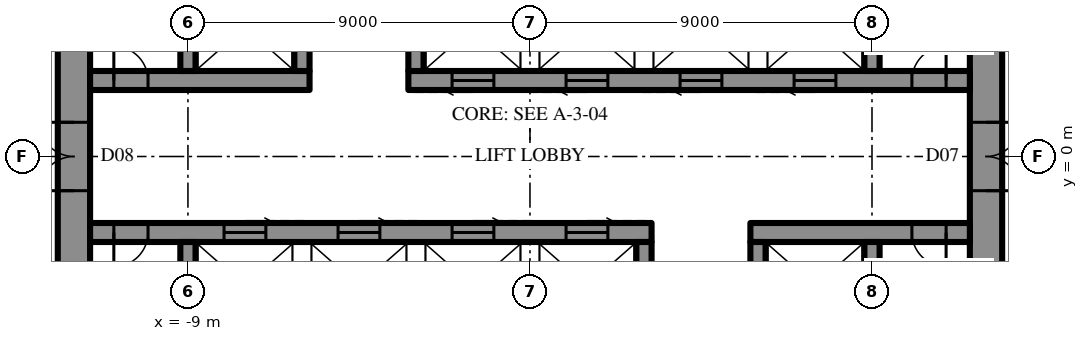
"""IFC4 building model, lengths in metres.
Left out: names, types, materials, properties, quantities, classifications, styles, units other than length and angle.
Written with IfcOpenShell. Run it as: python <this file> out.ifc"""

import sys

from ifc_helpers import new_model, si_unit, direction, frame, frame_2d, origin, place, context, subcontext, project, spatial, rectangle, extrude, element, fill, save


model = new_model("IFC4")
c1 = context("Model", 3, precision=1e-05, world=origin(), true_north=direction((0.0, 1.0)))
c2 = subcontext(c1, "Body", "Model", "MODEL_VIEW")
j1 = project(units=[si_unit("LENGTHUNIT", "METRE"), si_unit("PLANEANGLEUNIT", "RADIAN")], contexts=[c1])
p1 = place(None, origin())
s1 = spatial("IfcSite", under=j1, at=p1, CompositionType="ELEMENT")
p2 = place(p1, origin())
s2 = spatial("IfcBuilding", under=s1, at=p2, CompositionType="ELEMENT")
p3 = place(p2, frame((0.0, 0.0, 311.5)))
s3 = spatial("IfcBuildingStorey", under=s2, at=p3, CompositionType="ELEMENT", Elevation=311.5)
p4 = place(p3, frame((12.0, -10.7, 0.0), z_axis=(0.0, 0.0, 1.0), x_axis=(0.0, 1.0, 0.0)))
e1 = element("IfcWall", 1, at=p4, inside=s3, PredefinedType="SHEAR", context=c2, shape_type="SweptSolid", body=[
    extrude(rectangle(XDim=21.4, YDim=0.85, at=frame_2d((10.7, 0.0))), origin(), (0.0, 0.0, 1.0), 4.2),
])
p5 = place(p4, frame((9.8, 0.0, 0.0)))
e2 = element("IfcOpeningElement", 2, at=p5, cuts=e1, PredefinedType="OPENING", context=c2, shape_type="SweptSolid", body=[
    extrude(rectangle(XDim=1.8, YDim=2.4, at=frame_2d((0.9, 1.2))), frame((0.0, 0.435, 0.0), z_axis=(0.0, -1.0, 0.0), x_axis=(1.0, 0.0, 0.0)), (0.0, 0.0, 1.0), 0.87),
])
p6 = place(p3, frame((-12.0, 10.7, 0.0), z_axis=(0.0, 0.0, 1.0), x_axis=(0.0, -1.0, 0.0)))
e3 = element("IfcWall", 3, at=p6, inside=s3, PredefinedType="SHEAR", context=c2, shape_type="SweptSolid", body=[
    extrude(rectangle(XDim=21.4, YDim=0.85, at=frame_2d((10.7, 0.0))), origin(), (0.0, 0.0, 1.0), 4.2),
])
p7 = place(p6, frame((9.8, 0.0, 0.0)))
e4 = element("IfcOpeningElement", 4, at=p7, cuts=e3, PredefinedType="OPENING", context=c2, shape_type="SweptSolid", body=[
    extrude(rectangle(XDim=1.8, YDim=2.4, at=frame_2d((0.9, 1.2))), frame((0.0, 0.435, 0.0), z_axis=(0.0, -1.0, 0.0), x_axis=(1.0, 0.0, 0.0)), (0.0, 0.0, 1.0), 0.87),
])
p8 = place(p3, frame((-11.575, 2.0, 0.0), z_axis=(0.0, 0.0, 1.0), x_axis=(1.0, 0.0, 0.0)))
e5 = element("IfcWall", 5, at=p8, inside=s3, PredefinedType="SHEAR", context=c2, shape_type="SweptSolid", body=[
    extrude(rectangle(XDim=5.775, YDim=0.5, at=frame_2d((2.887, 0.0))), origin(), (0.0, 0.0, 1.0), 4.2),
])
p9 = place(p8, frame((0.625, 0.0, 0.0)))
e6 = element("IfcOpeningElement", 6, at=p9, cuts=e5, PredefinedType="OPENING", context=c2, shape_type="SweptSolid", body=[
    extrude(rectangle(XDim=0.9, YDim=2.2, at=frame_2d((0.45, 1.1))), frame((0.0, 0.26, 0.0), z_axis=(0.0, -1.0, 0.0), x_axis=(1.0, 0.0, 0.0)), (0.0, 0.0, 1.0), 0.52),
])
p10 = place(p3, frame((-3.2, 2.0, 0.0), z_axis=(0.0, 0.0, 1.0), x_axis=(1.0, 0.0, 0.0)))
e7 = element("IfcWall", 7, at=p10, inside=s3, PredefinedType="SHEAR", context=c2, shape_type="SweptSolid", body=[
    extrude(rectangle(XDim=14.775, YDim=0.5, at=frame_2d((7.387, 0.0))), origin(), (0.0, 0.0, 1.0), 4.2),
])
p11 = place(p10, frame((13.25, 0.0, 0.0)))
e8 = element("IfcOpeningElement", 8, at=p11, cuts=e7, PredefinedType="OPENING", context=c2, shape_type="SweptSolid", body=[
    extrude(rectangle(XDim=0.9, YDim=2.2, at=frame_2d((0.45, 1.1))), frame((0.0, 0.26, 0.0), z_axis=(0.0, -1.0, 0.0), x_axis=(1.0, 0.0, 0.0)), (0.0, 0.0, 1.0), 0.52),
])
p12 = place(p10, frame((1.15, 0.0, 0.0)))
e9 = element("IfcOpeningElement", 9, at=p12, cuts=e7, PredefinedType="OPENING", context=c2, shape_type="SweptSolid", body=[
    extrude(rectangle(XDim=1.1, YDim=2.2, at=frame_2d((0.55, 1.1))), frame((0.0, 0.26, 0.0), z_axis=(0.0, -1.0, 0.0), x_axis=(1.0, 0.0, 0.0)), (0.0, 0.0, 1.0), 0.52),
])
p13 = place(p10, frame((4.15, 0.0, 0.0)))
e10 = element("IfcOpeningElement", 10, at=p13, cuts=e7, PredefinedType="OPENING", context=c2, shape_type="SweptSolid", body=[
    extrude(rectangle(XDim=1.1, YDim=2.2, at=frame_2d((0.55, 1.1))), frame((0.0, 0.26, 0.0), z_axis=(0.0, -1.0, 0.0), x_axis=(1.0, 0.0, 0.0)), (0.0, 0.0, 1.0), 0.52),
])
p14 = place(p10, frame((7.15, 0.0, 0.0)))
e11 = element("IfcOpeningElement", 11, at=p14, cuts=e7, PredefinedType="OPENING", context=c2, shape_type="SweptSolid", body=[
    extrude(rectangle(XDim=1.1, YDim=2.2, at=frame_2d((0.55, 1.1))), frame((0.0, 0.26, 0.0), z_axis=(0.0, -1.0, 0.0), x_axis=(1.0, 0.0, 0.0)), (0.0, 0.0, 1.0), 0.52),
])
p15 = place(p10, frame((10.15, 0.0, 0.0)))
e12 = element("IfcOpeningElement", 12, at=p15, cuts=e7, PredefinedType="OPENING", context=c2, shape_type="SweptSolid", body=[
    extrude(rectangle(XDim=1.1, YDim=2.2, at=frame_2d((0.55, 1.1))), frame((0.0, 0.26, 0.0), z_axis=(0.0, -1.0, 0.0), x_axis=(1.0, 0.0, 0.0)), (0.0, 0.0, 1.0), 0.52),
])
for number, where, z_axis, x_axis in (
    (13, (-9.0, 2.25, 0.0), (0.0, 0.0, 1.0), (0.0, 1.0, 0.0)),
    (14, (-6.0, 2.25, 0.0), (0.0, 0.0, 1.0), (0.0, 1.0, 0.0)),
    (15, (-3.0, 2.25, 0.0), (0.0, 0.0, 1.0), (0.0, 1.0, 0.0)),
    (16, (9.0, 2.25, 0.0), (0.0, 0.0, 1.0), (0.0, 1.0, 0.0)),
):
    element("IfcWall", number, at=place(p3, frame(where, z_axis=z_axis, x_axis=x_axis)), inside=s3, PredefinedType="SHEAR", context=c2, shape_type="SweptSolid", body=[
        extrude(rectangle(XDim=2.3, YDim=0.4, at=frame_2d((1.15, 0.0))), origin(), (0.0, 0.0, 1.0), 4.2),
    ])
p16 = place(p3, frame((11.575, -2.0, 0.0), z_axis=(0.0, 0.0, 1.0), x_axis=(-1.0, 0.0, 0.0)))
e17 = element("IfcWall", 17, at=p16, inside=s3, PredefinedType="SHEAR", context=c2, shape_type="SweptSolid", body=[
    extrude(rectangle(XDim=5.775, YDim=0.5, at=frame_2d((2.887, 0.0))), origin(), (0.0, 0.0, 1.0), 4.2),
])
p17 = place(p16, frame((0.625, 0.0, 0.0)))
e18 = element("IfcOpeningElement", 18, at=p17, cuts=e17, PredefinedType="OPENING", context=c2, shape_type="SweptSolid", body=[
    extrude(rectangle(XDim=0.9, YDim=2.2, at=frame_2d((0.45, 1.1))), frame((0.0, 0.26, 0.0), z_axis=(0.0, -1.0, 0.0), x_axis=(1.0, 0.0, 0.0)), (0.0, 0.0, 1.0), 0.52),
])
p18 = place(p3, frame((3.2, -2.0, 0.0), z_axis=(0.0, 0.0, 1.0), x_axis=(-1.0, 0.0, 0.0)))
e19 = element("IfcWall", 19, at=p18, inside=s3, PredefinedType="SHEAR", context=c2, shape_type="SweptSolid", body=[
    extrude(rectangle(XDim=14.775, YDim=0.5, at=frame_2d((7.387, 0.0))), origin(), (0.0, 0.0, 1.0), 4.2),
])
p19 = place(p18, frame((13.25, 0.0, 0.0)))
e20 = element("IfcOpeningElement", 20, at=p19, cuts=e19, PredefinedType="OPENING", context=c2, shape_type="SweptSolid", body=[
    extrude(rectangle(XDim=0.9, YDim=2.2, at=frame_2d((0.45, 1.1))), frame((0.0, 0.26, 0.0), z_axis=(0.0, -1.0, 0.0), x_axis=(1.0, 0.0, 0.0)), (0.0, 0.0, 1.0), 0.52),
])
p20 = place(p18, frame((1.15, 0.0, 0.0)))
e21 = element("IfcOpeningElement", 21, at=p20, cuts=e19, PredefinedType="OPENING", context=c2, shape_type="SweptSolid", body=[
    extrude(rectangle(XDim=1.1, YDim=2.2, at=frame_2d((0.55, 1.1))), frame((0.0, 0.26, 0.0), z_axis=(0.0, -1.0, 0.0), x_axis=(1.0, 0.0, 0.0)), (0.0, 0.0, 1.0), 0.52),
])
p21 = place(p18, frame((4.15, 0.0, 0.0)))
e22 = element("IfcOpeningElement", 22, at=p21, cuts=e19, PredefinedType="OPENING", context=c2, shape_type="SweptSolid", body=[
    extrude(rectangle(XDim=1.1, YDim=2.2, at=frame_2d((0.55, 1.1))), frame((0.0, 0.26, 0.0), z_axis=(0.0, -1.0, 0.0), x_axis=(1.0, 0.0, 0.0)), (0.0, 0.0, 1.0), 0.52),
])
p22 = place(p18, frame((7.15, 0.0, 0.0)))
e23 = element("IfcOpeningElement", 23, at=p22, cuts=e19, PredefinedType="OPENING", context=c2, shape_type="SweptSolid", body=[
    extrude(rectangle(XDim=1.1, YDim=2.2, at=frame_2d((0.55, 1.1))), frame((0.0, 0.26, 0.0), z_axis=(0.0, -1.0, 0.0), x_axis=(1.0, 0.0, 0.0)), (0.0, 0.0, 1.0), 0.52),
])
p23 = place(p18, frame((10.15, 0.0, 0.0)))
e24 = element("IfcOpeningElement", 24, at=p23, cuts=e19, PredefinedType="OPENING", context=c2, shape_type="SweptSolid", body=[
    extrude(rectangle(XDim=1.1, YDim=2.2, at=frame_2d((0.55, 1.1))), frame((0.0, 0.26, 0.0), z_axis=(0.0, -1.0, 0.0), x_axis=(1.0, 0.0, 0.0)), (0.0, 0.0, 1.0), 0.52),
])
for number, where, z_axis, x_axis in (
    (25, (9.0, -2.25, 0.0), (0.0, 0.0, 1.0), (0.0, -1.0, 0.0)),
    (26, (6.0, -2.25, 0.0), (0.0, 0.0, 1.0), (0.0, -1.0, 0.0)),
    (27, (3.0, -2.25, 0.0), (0.0, 0.0, 1.0), (0.0, -1.0, 0.0)),
    (28, (-9.0, -2.25, 0.0), (0.0, 0.0, 1.0), (0.0, -1.0, 0.0)),
):
    element("IfcWall", number, at=place(p3, frame(where, z_axis=z_axis, x_axis=x_axis)), inside=s3, PredefinedType="SHEAR", context=c2, shape_type="SweptSolid", body=[
        extrude(rectangle(XDim=2.3, YDim=0.4, at=frame_2d((1.15, 0.0))), origin(), (0.0, 0.0, 1.0), 4.2),
    ])
p24 = place(p5, frame((1.8, 0.0, 0.0), z_axis=(0.0, 0.0, 1.0), x_axis=(-1.0, 0.0, 0.0)))
e29 = element("IfcDoor", 29, at=p24, inside=s3, OperationType="DOUBLE_DOOR_SINGLE_SWING", PredefinedType="DOOR", context=c2, shape_type="SweptSolid", body=[
    extrude(rectangle(XDim=1.8, YDim=2.4, at=frame_2d((0.9, 1.2))), frame((0.0, 0.025, 0.0), z_axis=(0.0, -1.0, 0.0), x_axis=(1.0, 0.0, 0.0)), (0.0, 0.0, 1.0), 0.05),
])
fill(e2, e29)
p25 = place(p7, frame((1.8, 0.0, 0.0), z_axis=(0.0, 0.0, 1.0), x_axis=(-1.0, 0.0, 0.0)))
e30 = element("IfcDoor", 30, at=p25, inside=s3, OperationType="DOUBLE_DOOR_SINGLE_SWING", PredefinedType="DOOR", context=c2, shape_type="SweptSolid", body=[
    extrude(rectangle(XDim=1.8, YDim=2.4, at=frame_2d((0.9, 1.2))), frame((0.0, 0.025, 0.0), z_axis=(0.0, -1.0, 0.0), x_axis=(1.0, 0.0, 0.0)), (0.0, 0.0, 1.0), 0.05),
])
fill(e4, e30)
p26 = place(p9, origin())
e31 = element("IfcDoor", 31, at=p26, inside=s3, OperationType="SINGLE_SWING_RIGHT", PredefinedType="DOOR", context=c2, shape_type="SweptSolid", body=[
    extrude(rectangle(XDim=0.9, YDim=2.2, at=frame_2d((0.45, 1.1))), frame((0.0, 0.025, 0.0), z_axis=(0.0, -1.0, 0.0), x_axis=(1.0, 0.0, 0.0)), (0.0, 0.0, 1.0), 0.05),
])
fill(e6, e31)
p27 = place(p11, origin())
e32 = element("IfcDoor", 32, at=p27, inside=s3, OperationType="SINGLE_SWING_LEFT", PredefinedType="DOOR", context=c2, shape_type="SweptSolid", body=[
    extrude(rectangle(XDim=0.9, YDim=2.2, at=frame_2d((0.45, 1.1))), frame((0.0, 0.025, 0.0), z_axis=(0.0, -1.0, 0.0), x_axis=(1.0, 0.0, 0.0)), (0.0, 0.0, 1.0), 0.05),
])
fill(e8, e32)
p28 = place(p17, origin())
e33 = element("IfcDoor", 33, at=p28, inside=s3, OperationType="SINGLE_SWING_RIGHT", PredefinedType="DOOR", context=c2, shape_type="SweptSolid", body=[
    extrude(rectangle(XDim=0.9, YDim=2.2, at=frame_2d((0.45, 1.1))), frame((0.0, 0.025, 0.0), z_axis=(0.0, -1.0, 0.0), x_axis=(1.0, 0.0, 0.0)), (0.0, 0.0, 1.0), 0.05),
])
fill(e18, e33)
p29 = place(p19, origin())
e34 = element("IfcDoor", 34, at=p29, inside=s3, OperationType="SINGLE_SWING_LEFT", PredefinedType="DOOR", context=c2, shape_type="SweptSolid", body=[
    extrude(rectangle(XDim=0.9, YDim=2.2, at=frame_2d((0.45, 1.1))), frame((0.0, 0.025, 0.0), z_axis=(0.0, -1.0, 0.0), x_axis=(1.0, 0.0, 0.0)), (0.0, 0.0, 1.0), 0.05),
])
fill(e20, e34)
p30 = place(p12, frame((1.1, 0.0, 0.0), z_axis=(0.0, 0.0, 1.0), x_axis=(-1.0, 0.0, 0.0)))
e35 = element("IfcDoor", 35, at=p30, inside=s3, OperationType="SLIDING_TO_LEFT", PredefinedType="DOOR", context=c2, shape_type="SweptSolid", body=[
    extrude(rectangle(XDim=1.1, YDim=2.2, at=frame_2d((0.55, 1.1))), frame((0.0, 0.025, 0.0), z_axis=(0.0, -1.0, 0.0), x_axis=(1.0, 0.0, 0.0)), (0.0, 0.0, 1.0), 0.05),
])
fill(e9, e35)
p31 = place(p13, frame((1.1, 0.0, 0.0), z_axis=(0.0, 0.0, 1.0), x_axis=(-1.0, 0.0, 0.0)))
e36 = element("IfcDoor", 36, at=p31, inside=s3, OperationType="SLIDING_TO_LEFT", PredefinedType="DOOR", context=c2, shape_type="SweptSolid", body=[
    extrude(rectangle(XDim=1.1, YDim=2.2, at=frame_2d((0.55, 1.1))), frame((0.0, 0.025, 0.0), z_axis=(0.0, -1.0, 0.0), x_axis=(1.0, 0.0, 0.0)), (0.0, 0.0, 1.0), 0.05),
])
fill(e10, e36)
p32 = place(p14, frame((1.1, 0.0, 0.0), z_axis=(0.0, 0.0, 1.0), x_axis=(-1.0, 0.0, 0.0)))
e37 = element("IfcDoor", 37, at=p32, inside=s3, OperationType="SLIDING_TO_LEFT", PredefinedType="DOOR", context=c2, shape_type="SweptSolid", body=[
    extrude(rectangle(XDim=1.1, YDim=2.2, at=frame_2d((0.55, 1.1))), frame((0.0, 0.025, 0.0), z_axis=(0.0, -1.0, 0.0), x_axis=(1.0, 0.0, 0.0)), (0.0, 0.0, 1.0), 0.05),
])
fill(e11, e37)
p33 = place(p15, frame((1.1, 0.0, 0.0), z_axis=(0.0, 0.0, 1.0), x_axis=(-1.0, 0.0, 0.0)))
e38 = element("IfcDoor", 38, at=p33, inside=s3, OperationType="SLIDING_TO_LEFT", PredefinedType="DOOR", context=c2, shape_type="SweptSolid", body=[
    extrude(rectangle(XDim=1.1, YDim=2.2, at=frame_2d((0.55, 1.1))), frame((0.0, 0.025, 0.0), z_axis=(0.0, -1.0, 0.0), x_axis=(1.0, 0.0, 0.0)), (0.0, 0.0, 1.0), 0.05),
])
fill(e12, e38)
p34 = place(p20, frame((1.1, 0.0, 0.0), z_axis=(0.0, 0.0, 1.0), x_axis=(-1.0, 0.0, 0.0)))
e39 = element("IfcDoor", 39, at=p34, inside=s3, OperationType="SLIDING_TO_LEFT", PredefinedType="DOOR", context=c2, shape_type="SweptSolid", body=[
    extrude(rectangle(XDim=1.1, YDim=2.2, at=frame_2d((0.55, 1.1))), frame((0.0, 0.025, 0.0), z_axis=(0.0, -1.0, 0.0), x_axis=(1.0, 0.0, 0.0)), (0.0, 0.0, 1.0), 0.05),
])
fill(e21, e39)
p35 = place(p21, frame((1.1, 0.0, 0.0), z_axis=(0.0, 0.0, 1.0), x_axis=(-1.0, 0.0, 0.0)))
e40 = element("IfcDoor", 40, at=p35, inside=s3, OperationType="SLIDING_TO_LEFT", PredefinedType="DOOR", context=c2, shape_type="SweptSolid", body=[
    extrude(rectangle(XDim=1.1, YDim=2.2, at=frame_2d((0.55, 1.1))), frame((0.0, 0.025, 0.0), z_axis=(0.0, -1.0, 0.0), x_axis=(1.0, 0.0, 0.0)), (0.0, 0.0, 1.0), 0.05),
])
fill(e22, e40)
p36 = place(p22, frame((1.1, 0.0, 0.0), z_axis=(0.0, 0.0, 1.0), x_axis=(-1.0, 0.0, 0.0)))
e41 = element("IfcDoor", 41, at=p36, inside=s3, OperationType="SLIDING_TO_LEFT", PredefinedType="DOOR", context=c2, shape_type="SweptSolid", body=[
    extrude(rectangle(XDim=1.1, YDim=2.2, at=frame_2d((0.55, 1.1))), frame((0.0, 0.025, 0.0), z_axis=(0.0, -1.0, 0.0), x_axis=(1.0, 0.0, 0.0)), (0.0, 0.0, 1.0), 0.05),
])
fill(e23, e41)
p37 = place(p23, frame((1.1, 0.0, 0.0), z_axis=(0.0, 0.0, 1.0), x_axis=(-1.0, 0.0, 0.0)))
e42 = element("IfcDoor", 42, at=p37, inside=s3, OperationType="SLIDING_TO_LEFT", PredefinedType="DOOR", context=c2, shape_type="SweptSolid", body=[
    extrude(rectangle(XDim=1.1, YDim=2.2, at=frame_2d((0.55, 1.1))), frame((0.0, 0.025, 0.0), z_axis=(0.0, -1.0, 0.0), x_axis=(1.0, 0.0, 0.0)), (0.0, 0.0, 1.0), 0.05),
])
fill(e24, e42)
save(model, sys.argv[1])
